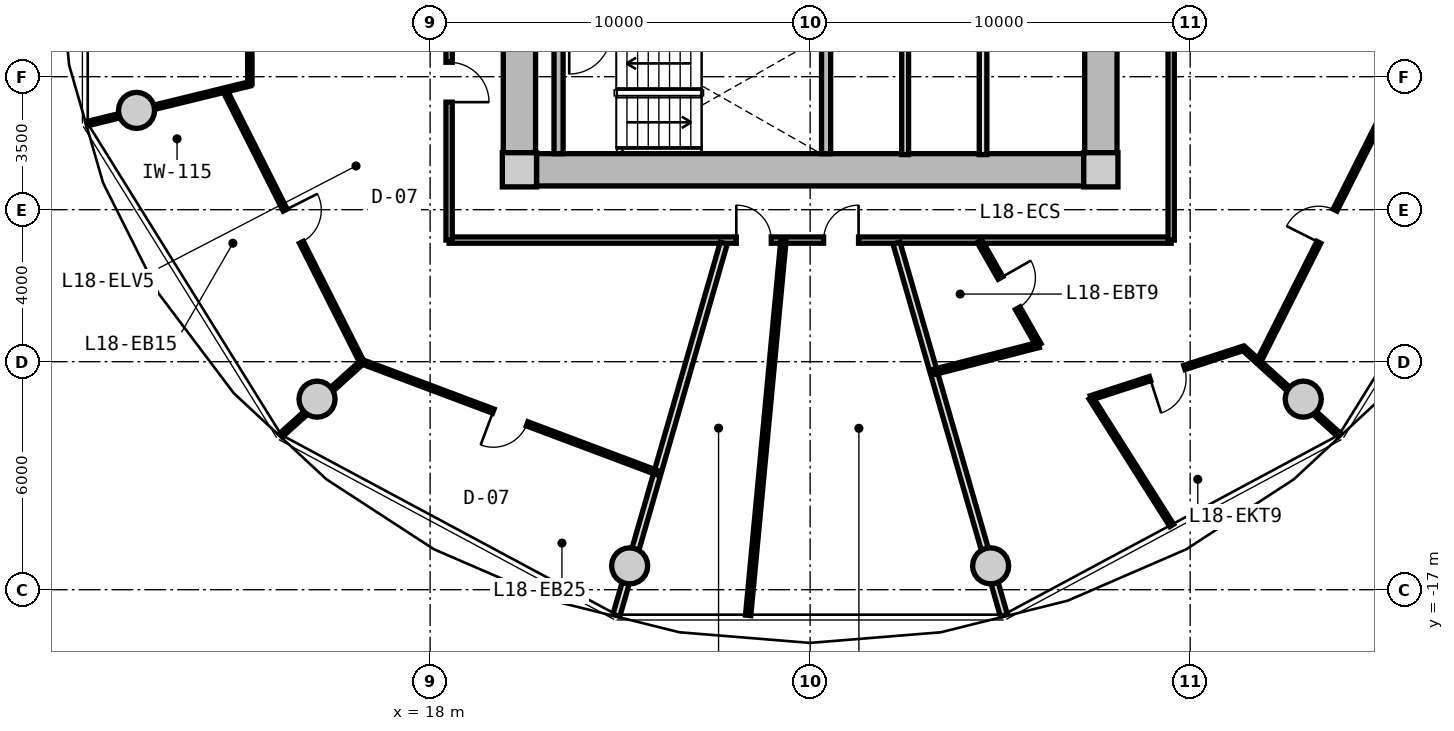
"""IFC4 building model, lengths in metres.
Left out: names, types, materials, properties, quantities, classifications, styles, units other than length and angle.
Written with IfcOpenShell. Run it as: python <this file> out.ifc"""

import sys

from ifc_helpers import new_model, si_unit, direction, frame, frame_2d, origin, origin_2d, place, context, subcontext, project, spatial, rectangle, circle, extrude, source, transform, mapped, element, fill, save


model = new_model("IFC4")
c1 = context("Model", 3, precision=1e-05, world=origin(), true_north=direction((0.0, 1.0)))
c2 = subcontext(c1, "Body", "Model", "MODEL_VIEW")
j1 = project(units=[si_unit("LENGTHUNIT", "METRE"), si_unit("PLANEANGLEUNIT", "RADIAN")], contexts=[c1])
p1 = place(None, origin())
s1 = spatial("IfcSite", under=j1, at=p1, CompositionType="ELEMENT")
p2 = place(p1, origin())
s2 = spatial("IfcBuilding", under=s1, at=p2, CompositionType="ELEMENT")
p3 = place(p2, frame((0.0, 0.0, 61.25)))
s3 = spatial("IfcBuildingStorey", under=s2, at=p3, CompositionType="ELEMENT", Elevation=61.25)
m1 = source(origin(), c2, "Body", "SweptSolid", [
    extrude(rectangle(XDim=0.9, YDim=0.9, at=origin_2d()), origin(), (0.0, 0.0, 1.0), 3.05),
])
for number, where, z_axis, x_axis in (
    (1, (20.35, -5.95, 0.0), (0.0, 0.0, 1.0), (1.0, 0.0, 0.0)),
    (2, (35.65, -5.95, 0.0), (0.0, 0.0, 1.0), (1.0, 0.0, 0.0)),
):
    element("IfcColumn", number, at=place(p3, frame(where, z_axis=z_axis, x_axis=x_axis)), inside=s3, PredefinedType="COLUMN", context=c2, shape_type="MappedRepresentation", body=[
        mapped(m1, transform((0.0, 0.0, 0.0), x_axis=(1.0, 0.0, 0.0), y_axis=(0.0, 1.0, 0.0), z_axis=(0.0, 0.0, 1.0), scale=1.0)),
    ])
m2 = source(origin(), c2, "Body", "SweptSolid", [
    extrude(rectangle(XDim=14.4, YDim=0.85, at=frame_2d((7.2, 0.0))), origin(), (0.0, 0.0, 1.0), 2.79),
])
p4 = place(p3, frame((35.2, -5.95, 0.0), z_axis=(0.0, 0.0, 1.0), x_axis=(-1.0, 0.0, 0.0)))
e3 = element("IfcWall", 3, at=p4, inside=s3, PredefinedType="SHEAR", context=c2, shape_type="MappedRepresentation", body=[
    mapped(m2, transform((0.0, 0.0, 0.0), x_axis=(1.0, 0.0, 0.0), y_axis=(0.0, 1.0, 0.0), z_axis=(0.0, 0.0, 1.0), scale=1.0)),
])
m3 = source(origin(), c2, "Body", "SweptSolid", [
    extrude(rectangle(XDim=11.0, YDim=0.85, at=frame_2d((5.5, 0.0))), origin(), (0.0, 0.0, 1.0), 2.79),
])
p5 = place(p3, frame((20.35, -5.5, 0.0), z_axis=(0.0, 0.0, 1.0), x_axis=(0.0, 1.0, 0.0)))
e4 = element("IfcWall", 4, at=p5, inside=s3, PredefinedType="SHEAR", context=c2, shape_type="MappedRepresentation", body=[
    mapped(m3, transform((0.0, 0.0, 0.0), x_axis=(1.0, 0.0, 0.0), y_axis=(0.0, 1.0, 0.0), z_axis=(0.0, 0.0, 1.0), scale=1.0)),
])
p6 = place(p5, frame((3.8, 0.0, 0.0)))
e5 = element("IfcOpeningElement", 5, at=p6, cuts=e4, PredefinedType="OPENING", context=c2, shape_type="SweptSolid", body=[
    extrude(rectangle(XDim=1.2, YDim=2.15, at=frame_2d((0.6, 1.075))), frame((0.0, 0.435, 0.0), z_axis=(0.0, -1.0, 0.0), x_axis=(1.0, 0.0, 0.0)), (0.0, 0.0, 1.0), 0.87),
])
p7 = place(p3, frame((35.65, 5.5, 0.0), z_axis=(0.0, 0.0, 1.0), x_axis=(0.0, -1.0, 0.0)))
e6 = element("IfcWall", 6, at=p7, inside=s3, PredefinedType="SHEAR", context=c2, shape_type="MappedRepresentation", body=[
    mapped(m3, transform((0.0, 0.0, 0.0), x_axis=(1.0, 0.0, 0.0), y_axis=(0.0, 1.0, 0.0), z_axis=(0.0, 0.0, 1.0), scale=1.0)),
])
p8 = place(p7, frame((5.65, 0.0, 0.0)))
e7 = element("IfcOpeningElement", 7, at=p8, cuts=e6, PredefinedType="OPENING", context=c2, shape_type="SweptSolid", body=[
    extrude(rectangle(XDim=1.2, YDim=2.15, at=frame_2d((0.6, 1.075))), frame((0.0, 0.435, 0.0), z_axis=(0.0, -1.0, 0.0), x_axis=(1.0, 0.0, 0.0)), (0.0, 0.0, 1.0), 0.87),
])
m4 = source(origin(), c2, "Body", "SweptSolid", [
    extrude(circle(Radius=0.475, at=origin_2d()), origin(), (0.0, 0.0, 1.0), 3.05),
])
for number, where, z_axis, x_axis in (
    (8, (10.275, -4.387, 0.0), (0.0, 0.0, 1.0), (1.0, 0.0, 0.0)),
    (9, (15.025, -11.985, 0.0), (0.0, 0.0, 1.0), (1.0, 0.0, 0.0)),
    (10, (23.251, -16.373, 0.0), (0.0, 0.0, 1.0), (1.0, 0.0, 0.0)),
    (11, (32.749, -16.373, 0.0), (0.0, 0.0, 1.0), (1.0, 0.0, 0.0)),
    (12, (40.975, -11.985, 0.0), (0.0, 0.0, 1.0), (1.0, 0.0, 0.0)),
):
    element("IfcColumn", number, at=place(p3, frame(where, z_axis=z_axis, x_axis=x_axis)), inside=s3, PredefinedType="COLUMN", context=c2, shape_type="MappedRepresentation", body=[
        mapped(m4, transform((0.0, 0.0, 0.0), x_axis=(1.0, 0.0, 0.0), y_axis=(0.0, 1.0, 0.0), z_axis=(0.0, 0.0, 1.0), scale=1.0)),
    ])
m5 = source(origin(), c2, "Body", "SweptSolid", [
    extrude(rectangle(XDim=3.075, YDim=0.24, at=frame_2d((1.538, 0.0))), origin(), (0.0, 0.0, 1.0), 2.79),
])
for number, where, z_axis, x_axis in (
    (13, (21.38, -5.525, 0.0), (0.0, 0.0, 1.0), (0.0, 1.0, 0.0)),
    (14, (28.42, -5.525, 0.0), (0.0, 0.0, 1.0), (0.0, 1.0, 0.0)),
):
    element("IfcWall", number, at=place(p3, frame(where, z_axis=z_axis, x_axis=x_axis)), inside=s3, PredefinedType="PARTITIONING", context=c2, shape_type="MappedRepresentation", body=[
        mapped(m5, transform((0.0, 0.0, 0.0), x_axis=(1.0, 0.0, 0.0), y_axis=(0.0, 1.0, 0.0), z_axis=(0.0, 0.0, 1.0), scale=1.0)),
    ])
m6 = source(origin(), c2, "Body", "SweptSolid", [
    extrude(rectangle(XDim=3.8, YDim=0.2, at=frame_2d((1.9, 0.0))), origin(), (0.0, 0.0, 1.0), 2.775),
])
p9 = place(p3, frame((32.55, -5.55, 0.0), z_axis=(0.0, 0.0, 1.0), x_axis=(0.0, 1.0, 0.0)))
e15 = element("IfcWall", 15, at=p9, inside=s3, PredefinedType="PARTITIONING", context=c2, shape_type="MappedRepresentation", body=[
    mapped(m6, transform((0.0, 0.0, 0.0), x_axis=(1.0, 0.0, 0.0), y_axis=(0.0, 1.0, 0.0), z_axis=(0.0, 0.0, 1.0), scale=1.0)),
])
m7 = source(origin(), c2, "Body", "SweptSolid", [
    extrude(rectangle(XDim=3.22, YDim=0.18, at=frame_2d((1.61, 0.0))), origin(), (0.0, 0.0, 1.0), 2.775),
])
p10 = place(p3, frame((30.5, -5.55, 0.0), z_axis=(0.0, 0.0, 1.0), x_axis=(0.0, 1.0, 0.0)))
e16 = element("IfcWall", 16, at=p10, inside=s3, PredefinedType="PARTITIONING", context=c2, shape_type="MappedRepresentation", body=[
    mapped(m7, transform((0.0, 0.0, 0.0), x_axis=(1.0, 0.0, 0.0), y_axis=(0.0, 1.0, 0.0), z_axis=(0.0, 0.0, 1.0), scale=1.0)),
])
m8 = source(origin(), c2, "Body", "SweptSolid", [
    extrude(rectangle(XDim=19.0, YDim=0.165, at=frame_2d((9.5, 0.0))), origin(), (0.0, 0.0, 1.0), 2.775),
])
p11 = place(p3, frame((37.5, -7.8, 0.0), z_axis=(0.0, 0.0, 1.0), x_axis=(-1.0, 0.0, 0.0)))
e17 = element("IfcWall", 17, at=p11, inside=s3, PredefinedType="PARTITIONING", context=c2, shape_type="MappedRepresentation", body=[
    mapped(m8, transform((0.0, 0.0, 0.0), x_axis=(1.0, 0.0, 0.0), y_axis=(0.0, 1.0, 0.0), z_axis=(0.0, 0.0, 1.0), scale=1.0)),
])
p12 = place(p11, frame((10.523, 0.0, 0.0)))
e18 = element("IfcOpeningElement", 18, at=p12, cuts=e17, PredefinedType="OPENING", context=c2, shape_type="SweptSolid", body=[
    extrude(rectangle(XDim=0.92, YDim=2.1, at=frame_2d((0.46, 1.05))), frame((0.0, 0.093, 0.0), z_axis=(0.0, -1.0, 0.0), x_axis=(1.0, 0.0, 0.0)), (0.0, 0.0, 1.0), 0.185),
])
p13 = place(p11, frame((8.226, 0.0, 0.0)))
e19 = element("IfcOpeningElement", 19, at=p13, cuts=e17, PredefinedType="OPENING", context=c2, shape_type="SweptSolid", body=[
    extrude(rectangle(XDim=0.92, YDim=2.1, at=frame_2d((0.46, 1.05))), frame((0.0, 0.093, 0.0), z_axis=(0.0, -1.0, 0.0), x_axis=(1.0, 0.0, 0.0)), (0.0, 0.0, 1.0), 0.185),
])
m9 = source(origin(), c2, "Body", "SweptSolid", [
    extrude(rectangle(XDim=15.6, YDim=0.165, at=frame_2d((7.8, 0.0))), origin(), (0.0, 0.0, 1.0), 2.775),
])
p14 = place(p3, frame((18.5, -7.8, 0.0), z_axis=(0.0, 0.0, 1.0), x_axis=(0.0, 1.0, 0.0)))
e20 = element("IfcWall", 20, at=p14, inside=s3, PredefinedType="PARTITIONING", context=c2, shape_type="MappedRepresentation", body=[
    mapped(m9, transform((0.0, 0.0, 0.0), x_axis=(1.0, 0.0, 0.0), y_axis=(0.0, 1.0, 0.0), z_axis=(0.0, 0.0, 1.0), scale=1.0)),
])
p15 = place(p14, frame((3.63, 0.0, 0.0)))
e21 = element("IfcOpeningElement", 21, at=p15, cuts=e20, PredefinedType="OPENING", context=c2, shape_type="SweptSolid", body=[
    extrude(rectangle(XDim=1.05, YDim=2.15, at=frame_2d((0.525, 1.075))), frame((0.0, 0.093, 0.0), z_axis=(0.0, -1.0, 0.0), x_axis=(1.0, 0.0, 0.0)), (0.0, 0.0, 1.0), 0.185),
])
p16 = place(p3, frame((37.5, 7.8, 0.0), z_axis=(0.0, 0.0, 1.0), x_axis=(0.0, -1.0, 0.0)))
e22 = element("IfcWall", 22, at=p16, inside=s3, PredefinedType="PARTITIONING", context=c2, shape_type="MappedRepresentation", body=[
    mapped(m9, transform((0.0, 0.0, 0.0), x_axis=(1.0, 0.0, 0.0), y_axis=(0.0, 1.0, 0.0), z_axis=(0.0, 0.0, 1.0), scale=1.0)),
])
p17 = place(p16, frame((7.275, 0.0, 0.0)))
e23 = element("IfcOpeningElement", 23, at=p17, cuts=e22, PredefinedType="OPENING", context=c2, shape_type="SweptSolid", body=[
    extrude(rectangle(XDim=1.05, YDim=2.15, at=frame_2d((0.525, 1.075))), frame((0.0, 0.093, 0.0), z_axis=(0.0, -1.0, 0.0), x_axis=(1.0, 0.0, 0.0)), (0.0, 0.0, 1.0), 0.185),
])
m10 = source(origin(), c2, "Body", "SweptSolid", [
    extrude(rectangle(XDim=10.196, YDim=0.19, at=frame_2d((5.098, 0.0))), origin(), (0.0, 0.0, 1.0), 2.225),
])
p18 = place(p3, frame((25.727, -7.88, 0.0), z_axis=(0.0, 0.0, 1.0), x_axis=(-0.277136420347, -0.960830580549, 0.0)))
e24 = element("IfcWall", 24, at=p18, inside=s3, PredefinedType="PARTITIONING", context=c2, shape_type="MappedRepresentation", body=[
    mapped(m10, transform((0.0, 0.0, 0.0), x_axis=(1.0, 0.0, 0.0), y_axis=(0.0, 1.0, 0.0), z_axis=(0.0, 0.0, 1.0), scale=1.0)),
])
m11 = source(origin(), c2, "Body", "SweptSolid", [
    extrude(rectangle(XDim=8.018, YDim=0.115, at=frame_2d((4.009, 0.0))), origin(), (0.0, 0.0, 1.0), 2.775),
])
p19 = place(p3, frame((12.596, -3.854, 0.0), z_axis=(0.0, 0.0, 1.0), x_axis=(0.450134355233, -0.89296084026, 0.0)))
e25 = element("IfcWall", 25, at=p19, inside=s3, PredefinedType="PARTITIONING", context=c2, shape_type="MappedRepresentation", body=[
    mapped(m11, transform((0.0, 0.0, 0.0), x_axis=(1.0, 0.0, 0.0), y_axis=(0.0, 1.0, 0.0), z_axis=(0.0, 0.0, 1.0), scale=1.0)),
])
p20 = place(p19, frame((3.534, 0.0, 0.0)))
e26 = element("IfcOpeningElement", 26, at=p20, cuts=e25, PredefinedType="OPENING", context=c2, shape_type="SweptSolid", body=[
    extrude(rectangle(XDim=0.95, YDim=2.1, at=frame_2d((0.475, 1.05))), frame((0.0, 0.067, 0.0), z_axis=(0.0, -1.0, 0.0), x_axis=(1.0, 0.0, 0.0)), (0.0, 0.0, 1.0), 0.135),
])
m12 = source(origin(), c2, "Body", "SweptSolid", [
    extrude(rectangle(XDim=4.414, YDim=0.115, at=frame_2d((2.207, 0.0))), origin(), (0.0, 0.0, 1.0), 2.225),
])
p21 = place(p3, frame((13.259, -3.688, 0.0), z_axis=(0.0, 0.0, 1.0), x_axis=(-0.971401274504, -0.237443812073, 0.0)))
e27 = element("IfcWall", 27, at=p21, inside=s3, PredefinedType="PARTITIONING", context=c2, shape_type="MappedRepresentation", body=[
    mapped(m12, transform((0.0, 0.0, 0.0), x_axis=(1.0, 0.0, 0.0), y_axis=(0.0, 1.0, 0.0), z_axis=(0.0, 0.0, 1.0), scale=1.0)),
])
m13 = source(origin(), c2, "Body", "SweptSolid", [
    extrude(rectangle(XDim=8.32, YDim=0.115, at=frame_2d((4.16, 0.0))), origin(), (0.0, 0.0, 1.0), 2.775),
])
p22 = place(p3, frame((16.214, -11.006, 0.0), z_axis=(0.0, 0.0, 1.0), x_axis=(0.936180763098, -0.351518959382, 0.0)))
e28 = element("IfcWall", 28, at=p22, inside=s3, PredefinedType="PARTITIONING", context=c2, shape_type="MappedRepresentation", body=[
    mapped(m13, transform((0.0, 0.0, 0.0), x_axis=(1.0, 0.0, 0.0), y_axis=(0.0, 1.0, 0.0), z_axis=(0.0, 0.0, 1.0), scale=1.0)),
])
p23 = place(p22, frame((3.685, 0.0, 0.0)))
e29 = element("IfcOpeningElement", 29, at=p23, cuts=e28, PredefinedType="OPENING", context=c2, shape_type="SweptSolid", body=[
    extrude(rectangle(XDim=0.95, YDim=2.1, at=frame_2d((0.475, 1.05))), frame((0.0, 0.067, 0.0), z_axis=(0.0, -1.0, 0.0), x_axis=(1.0, 0.0, 0.0)), (0.0, 0.0, 1.0), 0.135),
])
m14 = source(origin(), c2, "Body", "SweptSolid", [
    extrude(rectangle(XDim=2.887, YDim=0.115, at=frame_2d((1.444, 0.0))), origin(), (0.0, 0.0, 1.0), 2.225),
])
p24 = place(p3, frame((16.214, -11.006, 0.0), z_axis=(0.0, 0.0, 1.0), x_axis=(-0.742448503307, -0.669903142205, 0.0)))
e30 = element("IfcWall", 30, at=p24, inside=s3, PredefinedType="PARTITIONING", context=c2, shape_type="MappedRepresentation", body=[
    mapped(m14, transform((0.0, 0.0, 0.0), x_axis=(1.0, 0.0, 0.0), y_axis=(0.0, 1.0, 0.0), z_axis=(0.0, 0.0, 1.0), scale=1.0)),
])
m15 = source(origin(), c2, "Body", "SweptSolid", [
    extrude(rectangle(XDim=3.689, YDim=0.115, at=frame_2d((1.844, 0.0))), origin(), (0.0, 0.0, 1.0), 2.775),
])
p25 = place(p3, frame((13.25, 0.0, 0.0), z_axis=(0.0, 0.0, 1.0), x_axis=(0.001919382261, -0.999998157984, 0.0)))
e31 = element("IfcWall", 31, at=p25, inside=s3, PredefinedType="PARTITIONING", context=c2, shape_type="MappedRepresentation", body=[
    mapped(m15, transform((0.0, 0.0, 0.0), x_axis=(1.0, 0.0, 0.0), y_axis=(0.0, 1.0, 0.0), z_axis=(0.0, 0.0, 1.0), scale=1.0)),
])
p26 = place(p3, frame((30.273, -7.88, 0.0), z_axis=(0.0, 0.0, 1.0), x_axis=(0.277136420347, -0.960830580549, 0.0)))
e32 = element("IfcWall", 32, at=p26, inside=s3, PredefinedType="PARTITIONING", context=c2, shape_type="MappedRepresentation", body=[
    mapped(m10, transform((0.0, 0.0, 0.0), x_axis=(1.0, 0.0, 0.0), y_axis=(0.0, 1.0, 0.0), z_axis=(0.0, 0.0, 1.0), scale=1.0)),
])
m16 = source(origin(), c2, "Body", "SweptSolid", [
    extrude(rectangle(XDim=9.89, YDim=0.14, at=frame_2d((4.945, 0.0))), origin(), (0.0, 0.0, 1.0), 2.775),
])
p27 = place(p3, frame((27.296, -7.83, 0.0), z_axis=(0.0, 0.0, 1.0), x_axis=(-0.093780403478, -0.995592906726, 0.0)))
e33 = element("IfcWall", 33, at=p27, inside=s3, PredefinedType="PARTITIONING", context=c2, shape_type="MappedRepresentation", body=[
    mapped(m16, transform((0.0, 0.0, 0.0), x_axis=(1.0, 0.0, 0.0), y_axis=(0.0, 1.0, 0.0), z_axis=(0.0, 0.0, 1.0), scale=1.0)),
])
p28 = place(p3, frame((39.795, -11.014, 0.0), z_axis=(0.0, 0.0, 1.0), x_axis=(0.450134355233, 0.89296084026, 0.0)))
e34 = element("IfcWall", 34, at=p28, inside=s3, PredefinedType="PARTITIONING", context=c2, shape_type="MappedRepresentation", body=[
    mapped(m11, transform((0.0, 0.0, 0.0), x_axis=(1.0, 0.0, 0.0), y_axis=(0.0, 1.0, 0.0), z_axis=(0.0, 0.0, 1.0), scale=1.0)),
])
p29 = place(p28, frame((3.534, 0.0, 0.0)))
e35 = element("IfcOpeningElement", 35, at=p29, cuts=e34, PredefinedType="OPENING", context=c2, shape_type="SweptSolid", body=[
    extrude(rectangle(XDim=0.95, YDim=2.1, at=frame_2d((0.475, 1.05))), frame((0.0, 0.067, 0.0), z_axis=(0.0, -1.0, 0.0), x_axis=(1.0, 0.0, 0.0)), (0.0, 0.0, 1.0), 0.135),
])
m17 = source(origin(), c2, "Body", "SweptSolid", [
    extrude(rectangle(XDim=3.4, YDim=0.115, at=frame_2d((1.7, 0.0))), origin(), (0.0, 0.0, 1.0), 2.225),
])
p30 = place(p3, frame((39.411, -10.656, 0.0), z_axis=(0.0, 0.0, 1.0), x_axis=(0.740729005272, -0.671803945172, 0.0)))
e36 = element("IfcWall", 36, at=p30, inside=s3, PredefinedType="PARTITIONING", context=c2, shape_type="MappedRepresentation", body=[
    mapped(m17, transform((0.0, 0.0, 0.0), x_axis=(1.0, 0.0, 0.0), y_axis=(0.0, 1.0, 0.0), z_axis=(0.0, 0.0, 1.0), scale=1.0)),
])
m18 = source(origin(), c2, "Body", "SweptSolid", [
    extrude(rectangle(XDim=3.141, YDim=0.14, at=frame_2d((1.571, 0.0))), origin(), (0.0, 0.0, 1.0), 2.775),
])
p31 = place(p3, frame((32.458, -7.83, 0.0), z_axis=(0.0, 0.0, 1.0), x_axis=(0.494874486088, -0.868964465913, 0.0)))
e37 = element("IfcWall", 37, at=p31, inside=s3, PredefinedType="PARTITIONING", context=c2, shape_type="MappedRepresentation", body=[
    mapped(m18, transform((0.0, 0.0, 0.0), x_axis=(1.0, 0.0, 0.0), y_axis=(0.0, 1.0, 0.0), z_axis=(0.0, 0.0, 1.0), scale=1.0)),
])
p32 = place(p31, frame((1.111, 0.0, 0.0)))
e38 = element("IfcOpeningElement", 38, at=p32, cuts=e37, PredefinedType="OPENING", context=c2, shape_type="SweptSolid", body=[
    extrude(rectangle(XDim=0.92, YDim=2.1, at=frame_2d((0.46, 1.05))), frame((0.0, 0.08, 0.0), z_axis=(0.0, -1.0, 0.0), x_axis=(1.0, 0.0, 0.0)), (0.0, 0.0, 1.0), 0.16),
])
m19 = source(origin(), c2, "Body", "SweptSolid", [
    extrude(rectangle(XDim=2.868, YDim=0.14, at=frame_2d((1.434, 0.0))), origin(), (0.0, 0.0, 1.0), 2.775),
])
p33 = place(p3, frame((34.013, -10.56, 0.0), z_axis=(0.0, 0.0, 1.0), x_axis=(-0.968467705195, -0.249139125778, 0.0)))
e39 = element("IfcWall", 39, at=p33, inside=s3, PredefinedType="PARTITIONING", context=c2, shape_type="MappedRepresentation", body=[
    mapped(m19, transform((0.0, 0.0, 0.0), x_axis=(1.0, 0.0, 0.0), y_axis=(0.0, 1.0, 0.0), z_axis=(0.0, 0.0, 1.0), scale=1.0)),
])
m20 = source(origin(), c2, "Body", "SweptSolid", [
    extrude(rectangle(XDim=3.974, YDim=0.115, at=frame_2d((1.987, 0.0))), origin(), (0.0, 0.0, 1.0), 2.775),
])
p34 = place(p3, frame((35.389, -11.95, 0.0), z_axis=(0.0, 0.0, 1.0), x_axis=(0.534810918023, -0.844971764003, 0.0)))
e40 = element("IfcWall", 40, at=p34, inside=s3, PredefinedType="PARTITIONING", context=c2, shape_type="MappedRepresentation", body=[
    mapped(m20, transform((0.0, 0.0, 0.0), x_axis=(1.0, 0.0, 0.0), y_axis=(0.0, 1.0, 0.0), z_axis=(0.0, 0.0, 1.0), scale=1.0)),
])
m21 = source(origin(), c2, "Body", "SweptSolid", [
    extrude(rectangle(XDim=4.22, YDim=0.115, at=frame_2d((2.11, 0.0))), origin(), (0.0, 0.0, 1.0), 2.775),
])
p35 = place(p3, frame((35.389, -11.95, 0.0), z_axis=(0.0, 0.0, 1.0), x_axis=(0.951130539873, 0.308789080315, 0.0)))
e41 = element("IfcWall", 41, at=p35, inside=s3, PredefinedType="PARTITIONING", context=c2, shape_type="MappedRepresentation", body=[
    mapped(m21, transform((0.0, 0.0, 0.0), x_axis=(1.0, 0.0, 0.0), y_axis=(0.0, 1.0, 0.0), z_axis=(0.0, 0.0, 1.0), scale=1.0)),
])
p36 = place(p35, frame((1.635, 0.0, 0.0)))
e42 = element("IfcOpeningElement", 42, at=p36, cuts=e41, PredefinedType="OPENING", context=c2, shape_type="SweptSolid", body=[
    extrude(rectangle(XDim=0.95, YDim=2.1, at=frame_2d((0.475, 1.05))), frame((0.0, 0.067, 0.0), z_axis=(0.0, -1.0, 0.0), x_axis=(1.0, 0.0, 0.0)), (0.0, 0.0, 1.0), 0.135),
])
m22 = source(origin(), c2, "Body", "SweptSolid", [
    extrude(rectangle(XDim=1.05, YDim=2.15, at=frame_2d((0.525, 1.075))), frame((0.0, 0.025, 0.0), z_axis=(0.0, -1.0, 0.0), x_axis=(1.0, 0.0, 0.0)), (0.0, 0.0, 1.0), 0.05),
])
p37 = place(p15, frame((1.05, 0.0, 0.0), z_axis=(0.0, 0.0, 1.0), x_axis=(-1.0, 0.0, 0.0)))
e43 = element("IfcDoor", 43, at=p37, inside=s3, OperationType="SINGLE_SWING_RIGHT", PredefinedType="DOOR", context=c2, shape_type="MappedRepresentation", body=[
    mapped(m22, transform((0.0, 0.0, 0.0), x_axis=(1.0, 0.0, 0.0), y_axis=(0.0, 1.0, 0.0), z_axis=(0.0, 0.0, 1.0), scale=1.0)),
])
fill(e21, e43)
m23 = source(origin(), c2, "Body", "SweptSolid", [
    extrude(rectangle(XDim=0.95, YDim=2.1, at=frame_2d((0.475, 1.05))), frame((0.0, 0.025, 0.0), z_axis=(0.0, -1.0, 0.0), x_axis=(1.0, 0.0, 0.0)), (0.0, 0.0, 1.0), 0.05),
])
p38 = place(p20, origin())
e44 = element("IfcDoor", 44, at=p38, inside=s3, OperationType="SINGLE_SWING_LEFT", PredefinedType="DOOR", context=c2, shape_type="MappedRepresentation", body=[
    mapped(m23, transform((0.0, 0.0, 0.0), x_axis=(1.0, 0.0, 0.0), y_axis=(0.0, 1.0, 0.0), z_axis=(0.0, 0.0, 1.0), scale=1.0)),
])
fill(e26, e44)
p39 = place(p23, frame((0.95, 0.0, 0.0), z_axis=(0.0, 0.0, 1.0), x_axis=(-1.0, 0.0, 0.0)))
e45 = element("IfcDoor", 45, at=p39, inside=s3, OperationType="SINGLE_SWING_RIGHT", PredefinedType="DOOR", context=c2, shape_type="MappedRepresentation", body=[
    mapped(m23, transform((0.0, 0.0, 0.0), x_axis=(1.0, 0.0, 0.0), y_axis=(0.0, 1.0, 0.0), z_axis=(0.0, 0.0, 1.0), scale=1.0)),
])
fill(e29, e45)
m24 = source(origin(), c2, "Body", "SweptSolid", [
    extrude(rectangle(XDim=0.92, YDim=2.1, at=frame_2d((0.46, 1.05))), frame((0.0, 0.025, 0.0), z_axis=(0.0, -1.0, 0.0), x_axis=(1.0, 0.0, 0.0)), (0.0, 0.0, 1.0), 0.05),
])
p40 = place(p12, frame((0.92, 0.0, 0.0), z_axis=(0.0, 0.0, 1.0), x_axis=(-1.0, 0.0, 0.0)))
e46 = element("IfcDoor", 46, at=p40, inside=s3, OperationType="SINGLE_SWING_LEFT", PredefinedType="DOOR", context=c2, shape_type="MappedRepresentation", body=[
    mapped(m24, transform((0.0, 0.0, 0.0), x_axis=(1.0, 0.0, 0.0), y_axis=(0.0, 1.0, 0.0), z_axis=(0.0, 0.0, 1.0), scale=1.0)),
])
fill(e18, e46)
p41 = place(p13, frame((0.92, 0.0, 0.0), z_axis=(0.0, 0.0, 1.0), x_axis=(-1.0, 0.0, 0.0)))
e47 = element("IfcDoor", 47, at=p41, inside=s3, OperationType="SINGLE_SWING_RIGHT", PredefinedType="DOOR", context=c2, shape_type="MappedRepresentation", body=[
    mapped(m24, transform((0.0, 0.0, 0.0), x_axis=(1.0, 0.0, 0.0), y_axis=(0.0, 1.0, 0.0), z_axis=(0.0, 0.0, 1.0), scale=1.0)),
])
fill(e19, e47)
p42 = place(p32, origin())
e48 = element("IfcDoor", 48, at=p42, inside=s3, OperationType="SINGLE_SWING_LEFT", PredefinedType="DOOR", context=c2, shape_type="MappedRepresentation", body=[
    mapped(m24, transform((0.0, 0.0, 0.0), x_axis=(1.0, 0.0, 0.0), y_axis=(0.0, 1.0, 0.0), z_axis=(0.0, 0.0, 1.0), scale=1.0)),
])
fill(e38, e48)
p43 = place(p36, frame((0.95, 0.0, 0.0), z_axis=(0.0, 0.0, 1.0), x_axis=(-1.0, 0.0, 0.0)))
e49 = element("IfcDoor", 49, at=p43, inside=s3, OperationType="SINGLE_SWING_RIGHT", PredefinedType="DOOR", context=c2, shape_type="MappedRepresentation", body=[
    mapped(m23, transform((0.0, 0.0, 0.0), x_axis=(1.0, 0.0, 0.0), y_axis=(0.0, 1.0, 0.0), z_axis=(0.0, 0.0, 1.0), scale=1.0)),
])
fill(e42, e49)
p44 = place(p29, origin())
e50 = element("IfcDoor", 50, at=p44, inside=s3, OperationType="SINGLE_SWING_LEFT", PredefinedType="DOOR", context=c2, shape_type="MappedRepresentation", body=[
    mapped(m23, transform((0.0, 0.0, 0.0), x_axis=(1.0, 0.0, 0.0), y_axis=(0.0, 1.0, 0.0), z_axis=(0.0, 0.0, 1.0), scale=1.0)),
])
fill(e35, e50)
save(model, sys.argv[1])
